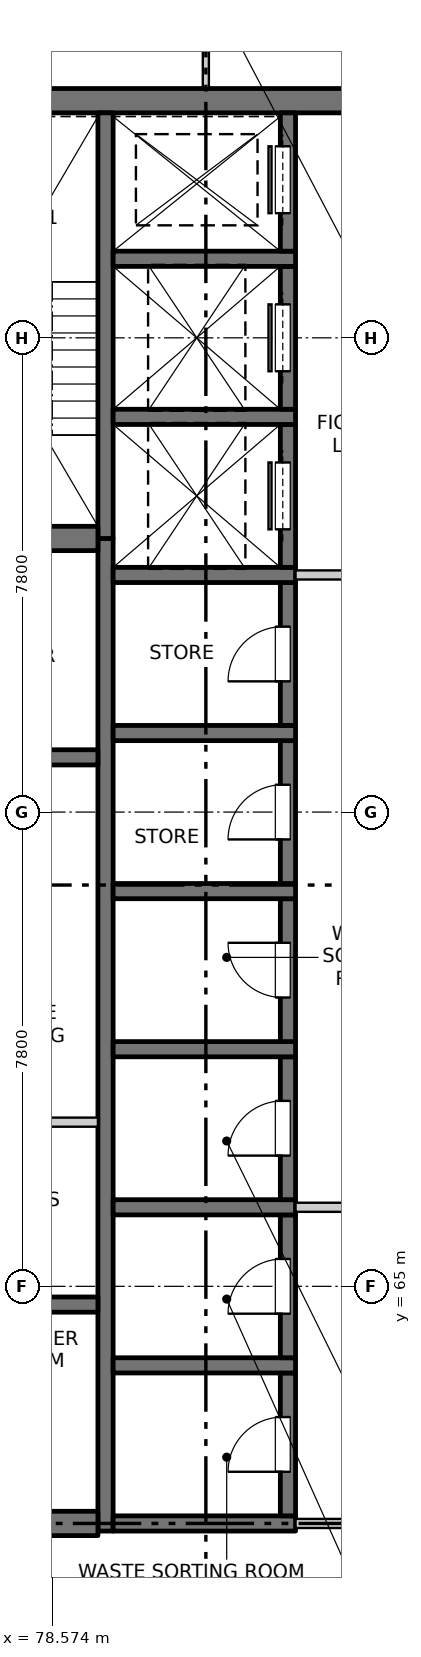
"""IFC4 building model, lengths in metres.
Left out: names, types, materials, properties, quantities, classifications, styles, units other than length and angle.
Written with IfcOpenShell. Run it as: python <this file> out.ifc"""

import sys

from ifc_helpers import new_model, si_unit, direction, frame, frame_2d, origin, place, context, subcontext, project, spatial, rectangle, extrude, element, fill, save


model = new_model("IFC4")
c1 = context("Model", 3, precision=1e-05, world=origin(), true_north=direction((0.0, 1.0)))
c2 = subcontext(c1, "Body", "Model", "MODEL_VIEW")
j1 = project(units=[si_unit("LENGTHUNIT", "METRE"), si_unit("PLANEANGLEUNIT", "RADIAN")], contexts=[c1])
p1 = place(None, origin())
s1 = spatial("IfcSite", under=j1, at=p1, CompositionType="ELEMENT")
p2 = place(p1, origin())
s2 = spatial("IfcBuilding", under=s1, at=p2, CompositionType="ELEMENT")
p3 = place(p2, frame((0.0, 0.0, 231.3)))
s3 = spatial("IfcBuildingStorey", under=s2, at=p3, CompositionType="ELEMENT", Elevation=231.3)
p4 = place(p3, frame((75.45, 84.5, -0.25), z_axis=(0.0, 0.0, 1.0), x_axis=(1.0, 0.0, 0.0)))
e1 = element("IfcWall", 1, at=p4, inside=s3, PredefinedType="SOLIDWALL", context=c2, shape_type="SweptSolid", body=[
    extrude(rectangle(XDim=19.1, YDim=0.4, at=frame_2d((9.55, 0.0))), origin(), (0.0, 0.0, 1.0), 3.4),
])
p5 = place(p3, frame((79.45, 60.975, -0.25), z_axis=(0.0, 0.0, 1.0), x_axis=(0.0, 1.0, 0.0)))
e2 = element("IfcWall", 2, at=p5, inside=s3, PredefinedType="SOLIDWALL", context=c2, shape_type="SweptSolid", body=[
    extrude(rectangle(XDim=16.325, YDim=0.25, at=frame_2d((8.163, 0.0))), origin(), (0.0, 0.0, 1.0), 3.4),
])
p6 = place(p3, frame((79.45, 77.3, -0.25), z_axis=(0.0, 0.0, 1.0), x_axis=(0.0, 1.0, 0.0)))
e3 = element("IfcWall", 3, at=p6, inside=s3, PredefinedType="SOLIDWALL", context=c2, shape_type="SweptSolid", body=[
    extrude(rectangle(XDim=7.0, YDim=0.25, at=frame_2d((3.5, 0.0))), origin(), (0.0, 0.0, 1.0), 3.4),
])
p7 = place(p3, frame((79.575, 61.1, -0.25), z_axis=(0.0, 0.0, 1.0), x_axis=(1.0, 0.0, 0.0)))
e4 = element("IfcWall", 4, at=p7, inside=s3, PredefinedType="SOLIDWALL", context=c2, shape_type="SweptSolid", body=[
    extrude(rectangle(XDim=3.0, YDim=0.25, at=frame_2d((1.5, 0.0))), origin(), (0.0, 0.0, 1.0), 3.4),
])
p8 = place(p3, frame((82.45, 61.225, -0.25), z_axis=(0.0, 0.0, 1.0), x_axis=(0.0, 1.0, 0.0)))
e5 = element("IfcWall", 5, at=p8, inside=s3, PredefinedType="SOLIDWALL", context=c2, shape_type="SweptSolid", body=[
    extrude(rectangle(XDim=2.35, YDim=0.25, at=frame_2d((1.175, 0.0))), origin(), (0.0, 0.0, 1.0), 3.4),
])
p9 = place(p8, frame((0.725, 0.0, 0.25)))
e6 = element("IfcOpeningElement", 6, at=p9, cuts=e5, PredefinedType="OPENING", context=c2, shape_type="SweptSolid", body=[
    extrude(rectangle(XDim=0.9, YDim=2.1, at=frame_2d((0.45, 1.05))), frame((0.0, 0.135, 0.0), z_axis=(0.0, -1.0, 0.0), x_axis=(1.0, 0.0, 0.0)), (0.0, 0.0, 1.0), 0.27),
])
p10 = place(p3, frame((79.575, 63.7, -0.25), z_axis=(0.0, 0.0, 1.0), x_axis=(1.0, 0.0, 0.0)))
e7 = element("IfcWall", 7, at=p10, inside=s3, PredefinedType="SOLIDWALL", context=c2, shape_type="SweptSolid", body=[
    extrude(rectangle(XDim=3.0, YDim=0.25, at=frame_2d((1.5, 0.0))), origin(), (0.0, 0.0, 1.0), 3.4),
])
p11 = place(p3, frame((82.45, 63.825, -0.25), z_axis=(0.0, 0.0, 1.0), x_axis=(0.0, 1.0, 0.0)))
e8 = element("IfcWall", 8, at=p11, inside=s3, PredefinedType="SOLIDWALL", context=c2, shape_type="SweptSolid", body=[
    extrude(rectangle(XDim=2.35, YDim=0.25, at=frame_2d((1.175, 0.0))), origin(), (0.0, 0.0, 1.0), 3.4),
])
p12 = place(p11, frame((0.725, 0.0, 0.25)))
e9 = element("IfcOpeningElement", 9, at=p12, cuts=e8, PredefinedType="OPENING", context=c2, shape_type="SweptSolid", body=[
    extrude(rectangle(XDim=0.9, YDim=2.1, at=frame_2d((0.45, 1.05))), frame((0.0, 0.135, 0.0), z_axis=(0.0, -1.0, 0.0), x_axis=(1.0, 0.0, 0.0)), (0.0, 0.0, 1.0), 0.27),
])
p13 = place(p3, frame((79.575, 66.3, -0.25), z_axis=(0.0, 0.0, 1.0), x_axis=(1.0, 0.0, 0.0)))
e10 = element("IfcWall", 10, at=p13, inside=s3, PredefinedType="SOLIDWALL", context=c2, shape_type="SweptSolid", body=[
    extrude(rectangle(XDim=3.0, YDim=0.25, at=frame_2d((1.5, 0.0))), origin(), (0.0, 0.0, 1.0), 3.4),
])
p14 = place(p3, frame((82.45, 66.425, -0.25), z_axis=(0.0, 0.0, 1.0), x_axis=(0.0, 1.0, 0.0)))
e11 = element("IfcWall", 11, at=p14, inside=s3, PredefinedType="SOLIDWALL", context=c2, shape_type="SweptSolid", body=[
    extrude(rectangle(XDim=2.35, YDim=0.25, at=frame_2d((1.175, 0.0))), origin(), (0.0, 0.0, 1.0), 3.4),
])
p15 = place(p14, frame((0.725, 0.0, 0.25)))
e12 = element("IfcOpeningElement", 12, at=p15, cuts=e11, PredefinedType="OPENING", context=c2, shape_type="SweptSolid", body=[
    extrude(rectangle(XDim=0.9, YDim=2.1, at=frame_2d((0.45, 1.05))), frame((0.0, 0.135, 0.0), z_axis=(0.0, -1.0, 0.0), x_axis=(1.0, 0.0, 0.0)), (0.0, 0.0, 1.0), 0.27),
])
p16 = place(p3, frame((79.575, 68.9, -0.25), z_axis=(0.0, 0.0, 1.0), x_axis=(1.0, 0.0, 0.0)))
e13 = element("IfcWall", 13, at=p16, inside=s3, PredefinedType="SOLIDWALL", context=c2, shape_type="SweptSolid", body=[
    extrude(rectangle(XDim=3.0, YDim=0.25, at=frame_2d((1.5, 0.0))), origin(), (0.0, 0.0, 1.0), 3.4),
])
p17 = place(p3, frame((82.45, 69.025, -0.25), z_axis=(0.0, 0.0, 1.0), x_axis=(0.0, 1.0, 0.0)))
e14 = element("IfcWall", 14, at=p17, inside=s3, PredefinedType="SOLIDWALL", context=c2, shape_type="SweptSolid", body=[
    extrude(rectangle(XDim=2.35, YDim=0.25, at=frame_2d((1.175, 0.0))), origin(), (0.0, 0.0, 1.0), 3.4),
])
p18 = place(p17, frame((0.725, 0.0, 0.25)))
e15 = element("IfcOpeningElement", 15, at=p18, cuts=e14, PredefinedType="OPENING", context=c2, shape_type="SweptSolid", body=[
    extrude(rectangle(XDim=0.9, YDim=2.1, at=frame_2d((0.45, 1.05))), frame((0.0, 0.135, 0.0), z_axis=(0.0, -1.0, 0.0), x_axis=(1.0, 0.0, 0.0)), (0.0, 0.0, 1.0), 0.27),
])
p19 = place(p3, frame((79.575, 71.5, -0.25), z_axis=(0.0, 0.0, 1.0), x_axis=(1.0, 0.0, 0.0)))
e16 = element("IfcWall", 16, at=p19, inside=s3, PredefinedType="SOLIDWALL", context=c2, shape_type="SweptSolid", body=[
    extrude(rectangle(XDim=3.0, YDim=0.25, at=frame_2d((1.5, 0.0))), origin(), (0.0, 0.0, 1.0), 3.4),
])
p20 = place(p3, frame((82.45, 71.625, -0.25), z_axis=(0.0, 0.0, 1.0), x_axis=(0.0, 1.0, 0.0)))
e17 = element("IfcWall", 17, at=p20, inside=s3, PredefinedType="SOLIDWALL", context=c2, shape_type="SweptSolid", body=[
    extrude(rectangle(XDim=2.35, YDim=0.25, at=frame_2d((1.175, 0.0))), origin(), (0.0, 0.0, 1.0), 3.4),
])
p21 = place(p20, frame((0.725, 0.0, 0.25)))
e18 = element("IfcOpeningElement", 18, at=p21, cuts=e17, PredefinedType="OPENING", context=c2, shape_type="SweptSolid", body=[
    extrude(rectangle(XDim=0.9, YDim=2.1, at=frame_2d((0.45, 1.05))), frame((0.0, 0.135, 0.0), z_axis=(0.0, -1.0, 0.0), x_axis=(1.0, 0.0, 0.0)), (0.0, 0.0, 1.0), 0.27),
])
p22 = place(p3, frame((79.575, 74.1, -0.25), z_axis=(0.0, 0.0, 1.0), x_axis=(1.0, 0.0, 0.0)))
e19 = element("IfcWall", 19, at=p22, inside=s3, PredefinedType="SOLIDWALL", context=c2, shape_type="SweptSolid", body=[
    extrude(rectangle(XDim=3.0, YDim=0.25, at=frame_2d((1.5, 0.0))), origin(), (0.0, 0.0, 1.0), 3.4),
])
p23 = place(p3, frame((82.45, 74.225, -0.25), z_axis=(0.0, 0.0, 1.0), x_axis=(0.0, 1.0, 0.0)))
e20 = element("IfcWall", 20, at=p23, inside=s3, PredefinedType="SOLIDWALL", context=c2, shape_type="SweptSolid", body=[
    extrude(rectangle(XDim=2.35, YDim=0.25, at=frame_2d((1.175, 0.0))), origin(), (0.0, 0.0, 1.0), 3.4),
])
p24 = place(p23, frame((0.725, 0.0, 0.25)))
e21 = element("IfcOpeningElement", 21, at=p24, cuts=e20, PredefinedType="OPENING", context=c2, shape_type="SweptSolid", body=[
    extrude(rectangle(XDim=0.9, YDim=2.1, at=frame_2d((0.45, 1.05))), frame((0.0, 0.135, 0.0), z_axis=(0.0, -1.0, 0.0), x_axis=(1.0, 0.0, 0.0)), (0.0, 0.0, 1.0), 0.27),
])
p25 = place(p3, frame((79.575, 76.7, -0.25), z_axis=(0.0, 0.0, 1.0), x_axis=(1.0, 0.0, 0.0)))
e22 = element("IfcWall", 22, at=p25, inside=s3, PredefinedType="SOLIDWALL", context=c2, shape_type="SweptSolid", body=[
    extrude(rectangle(XDim=3.0, YDim=0.25, at=frame_2d((1.5, 0.0))), origin(), (0.0, 0.0, 1.0), 3.4),
])
p26 = place(p3, frame((82.45, 76.825, -0.25), z_axis=(0.0, 0.0, 1.0), x_axis=(0.0, 1.0, 0.0)))
e23 = element("IfcWall", 23, at=p26, inside=s3, PredefinedType="SOLIDWALL", context=c2, shape_type="SweptSolid", body=[
    extrude(rectangle(XDim=2.35, YDim=0.25, at=frame_2d((1.175, 0.0))), origin(), (0.0, 0.0, 1.0), 3.4),
])
p27 = place(p26, frame((0.625, 0.0, 0.25)))
e24 = element("IfcOpeningElement", 24, at=p27, cuts=e23, PredefinedType="OPENING", context=c2, shape_type="SweptSolid", body=[
    extrude(rectangle(XDim=1.1, YDim=2.1, at=frame_2d((0.55, 1.05))), frame((0.0, 0.135, 0.0), z_axis=(0.0, -1.0, 0.0), x_axis=(1.0, 0.0, 0.0)), (0.0, 0.0, 1.0), 0.27),
])
p28 = place(p3, frame((79.575, 79.3, -0.25), z_axis=(0.0, 0.0, 1.0), x_axis=(1.0, 0.0, 0.0)))
e25 = element("IfcWall", 25, at=p28, inside=s3, PredefinedType="SOLIDWALL", context=c2, shape_type="SweptSolid", body=[
    extrude(rectangle(XDim=3.0, YDim=0.25, at=frame_2d((1.5, 0.0))), origin(), (0.0, 0.0, 1.0), 3.4),
])
p29 = place(p3, frame((82.45, 79.425, -0.25), z_axis=(0.0, 0.0, 1.0), x_axis=(0.0, 1.0, 0.0)))
e26 = element("IfcWall", 26, at=p29, inside=s3, PredefinedType="SOLIDWALL", context=c2, shape_type="SweptSolid", body=[
    extrude(rectangle(XDim=2.35, YDim=0.25, at=frame_2d((1.175, 0.0))), origin(), (0.0, 0.0, 1.0), 3.4),
])
p30 = place(p29, frame((0.625, 0.0, 0.25)))
e27 = element("IfcOpeningElement", 27, at=p30, cuts=e26, PredefinedType="OPENING", context=c2, shape_type="SweptSolid", body=[
    extrude(rectangle(XDim=1.1, YDim=2.1, at=frame_2d((0.55, 1.05))), frame((0.0, 0.135, 0.0), z_axis=(0.0, -1.0, 0.0), x_axis=(1.0, 0.0, 0.0)), (0.0, 0.0, 1.0), 0.27),
])
p31 = place(p3, frame((79.575, 81.9, -0.25), z_axis=(0.0, 0.0, 1.0), x_axis=(1.0, 0.0, 0.0)))
e28 = element("IfcWall", 28, at=p31, inside=s3, PredefinedType="SOLIDWALL", context=c2, shape_type="SweptSolid", body=[
    extrude(rectangle(XDim=3.0, YDim=0.25, at=frame_2d((1.5, 0.0))), origin(), (0.0, 0.0, 1.0), 3.4),
])
p32 = place(p3, frame((82.45, 82.025, -0.25), z_axis=(0.0, 0.0, 1.0), x_axis=(0.0, 1.0, 0.0)))
e29 = element("IfcWall", 29, at=p32, inside=s3, PredefinedType="SOLIDWALL", context=c2, shape_type="SweptSolid", body=[
    extrude(rectangle(XDim=2.275, YDim=0.25, at=frame_2d((1.138, 0.0))), origin(), (0.0, 0.0, 1.0), 3.4),
])
p33 = place(p32, frame((0.625, 0.0, 0.25)))
e30 = element("IfcOpeningElement", 30, at=p33, cuts=e29, PredefinedType="OPENING", context=c2, shape_type="SweptSolid", body=[
    extrude(rectangle(XDim=1.1, YDim=2.1, at=frame_2d((0.55, 1.05))), frame((0.0, 0.135, 0.0), z_axis=(0.0, -1.0, 0.0), x_axis=(1.0, 0.0, 0.0)), (0.0, 0.0, 1.0), 0.27),
])
p34 = place(p3, frame((75.45, 61.1, -0.25), z_axis=(0.0, 0.0, 1.0), x_axis=(1.0, 0.0, 0.0)))
e31 = element("IfcWall", 31, at=p34, inside=s3, PredefinedType="SOLIDWALL", context=c2, shape_type="SweptSolid", body=[
    extrude(rectangle(XDim=3.875, YDim=0.4, at=frame_2d((1.938, 0.0))), origin(), (0.0, 0.0, 1.0), 3.4),
])
for number, where, z_axis, x_axis in (
    (32, (75.45, 64.7, -0.25), (0.0, 0.0, 1.0), (1.0, 0.0, 0.0)),
    (33, (75.45, 73.7, -0.25), (0.0, 0.0, 1.0), (1.0, 0.0, 0.0)),
):
    element("IfcWall", number, at=place(p3, frame(where, z_axis=z_axis, x_axis=x_axis)), inside=s3, PredefinedType="SOLIDWALL", context=c2, shape_type="SweptSolid", body=[
        extrude(rectangle(XDim=3.875, YDim=0.25, at=frame_2d((1.938, 0.0))), origin(), (0.0, 0.0, 1.0), 3.4),
    ])
p35 = place(p3, frame((75.45, 77.3, -0.25), z_axis=(0.0, 0.0, 1.0), x_axis=(1.0, 0.0, 0.0)))
e34 = element("IfcWall", 34, at=p35, inside=s3, PredefinedType="SOLIDWALL", context=c2, shape_type="SweptSolid", body=[
    extrude(rectangle(XDim=3.875, YDim=0.4, at=frame_2d((1.938, 0.0))), origin(), (0.0, 0.0, 1.0), 3.4),
])
p36 = place(p3, frame((82.575, 61.1, 0.0), z_axis=(0.0, 0.0, 1.0), x_axis=(1.0, 0.0, 0.0)))
e35 = element("IfcWall", 35, at=p36, inside=s3, PredefinedType="PARTITIONING", context=c2, shape_type="SweptSolid", body=[
    extrude(rectangle(XDim=4.85, YDim=0.15, at=frame_2d((2.425, 0.0))), origin(), (0.0, 0.0, 1.0), 3.15),
])
p37 = place(p36, frame((1.525, 0.0, 0.0)))
e36 = element("IfcOpeningElement", 36, at=p37, cuts=e35, PredefinedType="OPENING", context=c2, shape_type="SweptSolid", body=[
    extrude(rectangle(XDim=1.8, YDim=2.1, at=frame_2d((0.9, 1.05))), frame((0.0, 0.085, 0.0), z_axis=(0.0, -1.0, 0.0), x_axis=(1.0, 0.0, 0.0)), (0.0, 0.0, 1.0), 0.17),
])
p38 = place(p3, frame((82.575, 66.3, 0.0), z_axis=(0.0, 0.0, 1.0), x_axis=(1.0, 0.0, 0.0)))
e37 = element("IfcWall", 37, at=p38, inside=s3, PredefinedType="PARTITIONING", context=c2, shape_type="SweptSolid", body=[
    extrude(rectangle(XDim=4.85, YDim=0.15, at=frame_2d((2.425, 0.0))), origin(), (0.0, 0.0, 1.0), 3.15),
])
p39 = place(p38, frame((1.525, 0.0, 0.0)))
e38 = element("IfcOpeningElement", 38, at=p39, cuts=e37, PredefinedType="OPENING", context=c2, shape_type="SweptSolid", body=[
    extrude(rectangle(XDim=1.8, YDim=2.1, at=frame_2d((0.9, 1.05))), frame((0.0, 0.085, 0.0), z_axis=(0.0, -1.0, 0.0), x_axis=(1.0, 0.0, 0.0)), (0.0, 0.0, 1.0), 0.17),
])
p40 = place(p3, frame((75.45, 67.7, 0.0), z_axis=(0.0, 0.0, 1.0), x_axis=(1.0, 0.0, 0.0)))
e39 = element("IfcWall", 39, at=p40, inside=s3, PredefinedType="PARTITIONING", context=c2, shape_type="SweptSolid", body=[
    extrude(rectangle(XDim=3.875, YDim=0.15, at=frame_2d((1.938, 0.0))), origin(), (0.0, 0.0, 1.0), 3.15),
])
p41 = place(p3, frame((82.575, 76.7, 0.0), z_axis=(0.0, 0.0, 1.0), x_axis=(1.0, 0.0, 0.0)))
e40 = element("IfcWall", 40, at=p41, inside=s3, PredefinedType="PARTITIONING", context=c2, shape_type="SweptSolid", body=[
    extrude(rectangle(XDim=4.85, YDim=0.15, at=frame_2d((2.425, 0.0))), origin(), (0.0, 0.0, 1.0), 3.15),
])
p42 = place(p41, frame((1.525, 0.0, 0.0)))
e41 = element("IfcOpeningElement", 41, at=p42, cuts=e40, PredefinedType="OPENING", context=c2, shape_type="SweptSolid", body=[
    extrude(rectangle(XDim=1.8, YDim=2.1, at=frame_2d((0.9, 1.05))), frame((0.0, 0.085, 0.0), z_axis=(0.0, -1.0, 0.0), x_axis=(1.0, 0.0, 0.0)), (0.0, 0.0, 1.0), 0.17),
])
p43 = place(p3, frame((81.1, 84.7, 0.0), z_axis=(0.0, 0.0, 1.0), x_axis=(0.0, 1.0, 0.0)))
e42 = element("IfcWall", 42, at=p43, inside=s3, PredefinedType="PARTITIONING", context=c2, shape_type="SweptSolid", body=[
    extrude(rectangle(XDim=3.4, YDim=0.1, at=frame_2d((1.7, 0.0))), origin(), (0.0, 0.0, 1.0), 3.15),
])
p44 = place(p43, frame((1.3, 0.0, 0.0)))
e43 = element("IfcOpeningElement", 43, at=p44, cuts=e42, PredefinedType="OPENING", context=c2, shape_type="SweptSolid", body=[
    extrude(rectangle(XDim=0.9, YDim=2.1, at=frame_2d((0.45, 1.05))), frame((0.0, 0.06, 0.0), z_axis=(0.0, -1.0, 0.0), x_axis=(1.0, 0.0, 0.0)), (0.0, 0.0, 1.0), 0.12),
])
p45 = place(p9, origin())
e44 = element("IfcDoor", 44, at=p45, inside=s3, OperationType="SINGLE_SWING_LEFT", PredefinedType="DOOR", context=c2, shape_type="SweptSolid", body=[
    extrude(rectangle(XDim=0.9, YDim=2.1, at=frame_2d((0.45, 1.05))), frame((0.0, 0.11, 0.0), z_axis=(0.0, -1.0, 0.0), x_axis=(1.0, 0.0, 0.0)), (0.0, 0.0, 1.0), 0.05),
])
fill(e6, e44)
p46 = place(p12, origin())
e45 = element("IfcDoor", 45, at=p46, inside=s3, OperationType="SINGLE_SWING_LEFT", PredefinedType="DOOR", context=c2, shape_type="SweptSolid", body=[
    extrude(rectangle(XDim=0.9, YDim=2.1, at=frame_2d((0.45, 1.05))), frame((0.0, 0.11, 0.0), z_axis=(0.0, -1.0, 0.0), x_axis=(1.0, 0.0, 0.0)), (0.0, 0.0, 1.0), 0.05),
])
fill(e9, e45)
p47 = place(p15, origin())
e46 = element("IfcDoor", 46, at=p47, inside=s3, OperationType="SINGLE_SWING_LEFT", PredefinedType="DOOR", context=c2, shape_type="SweptSolid", body=[
    extrude(rectangle(XDim=0.9, YDim=2.1, at=frame_2d((0.45, 1.05))), frame((0.0, 0.11, 0.0), z_axis=(0.0, -1.0, 0.0), x_axis=(1.0, 0.0, 0.0)), (0.0, 0.0, 1.0), 0.05),
])
fill(e12, e46)
p48 = place(p18, origin())
e47 = element("IfcDoor", 47, at=p48, inside=s3, OperationType="SINGLE_SWING_RIGHT", PredefinedType="DOOR", context=c2, shape_type="SweptSolid", body=[
    extrude(rectangle(XDim=0.9, YDim=2.1, at=frame_2d((0.45, 1.05))), frame((0.0, 0.11, 0.0), z_axis=(0.0, -1.0, 0.0), x_axis=(1.0, 0.0, 0.0)), (0.0, 0.0, 1.0), 0.05),
])
fill(e15, e47)
p49 = place(p21, origin())
e48 = element("IfcDoor", 48, at=p49, inside=s3, OperationType="SINGLE_SWING_LEFT", PredefinedType="DOOR", context=c2, shape_type="SweptSolid", body=[
    extrude(rectangle(XDim=0.9, YDim=2.1, at=frame_2d((0.45, 1.05))), frame((0.0, 0.11, 0.0), z_axis=(0.0, -1.0, 0.0), x_axis=(1.0, 0.0, 0.0)), (0.0, 0.0, 1.0), 0.05),
])
fill(e18, e48)
p50 = place(p24, origin())
e49 = element("IfcDoor", 49, at=p50, inside=s3, OperationType="SINGLE_SWING_LEFT", PredefinedType="DOOR", context=c2, shape_type="SweptSolid", body=[
    extrude(rectangle(XDim=0.9, YDim=2.1, at=frame_2d((0.45, 1.05))), frame((0.0, 0.11, 0.0), z_axis=(0.0, -1.0, 0.0), x_axis=(1.0, 0.0, 0.0)), (0.0, 0.0, 1.0), 0.05),
])
fill(e21, e49)
p51 = place(p27, origin())
e50 = element("IfcDoor", 50, at=p51, inside=s3, OperationType="SLIDING_TO_LEFT", PredefinedType="DOOR", context=c2, shape_type="SweptSolid", body=[
    extrude(rectangle(XDim=1.1, YDim=2.1, at=frame_2d((0.55, 1.05))), frame((0.0, 0.11, 0.0), z_axis=(0.0, -1.0, 0.0), x_axis=(1.0, 0.0, 0.0)), (0.0, 0.0, 1.0), 0.05),
])
fill(e24, e50)
p52 = place(p30, origin())
e51 = element("IfcDoor", 51, at=p52, inside=s3, OperationType="SLIDING_TO_LEFT", PredefinedType="DOOR", context=c2, shape_type="SweptSolid", body=[
    extrude(rectangle(XDim=1.1, YDim=2.1, at=frame_2d((0.55, 1.05))), frame((0.0, 0.11, 0.0), z_axis=(0.0, -1.0, 0.0), x_axis=(1.0, 0.0, 0.0)), (0.0, 0.0, 1.0), 0.05),
])
fill(e27, e51)
p53 = place(p33, origin())
e52 = element("IfcDoor", 52, at=p53, inside=s3, OperationType="SLIDING_TO_RIGHT", PredefinedType="DOOR", context=c2, shape_type="SweptSolid", body=[
    extrude(rectangle(XDim=1.1, YDim=2.1, at=frame_2d((0.55, 1.05))), frame((0.0, 0.11, 0.0), z_axis=(0.0, -1.0, 0.0), x_axis=(1.0, 0.0, 0.0)), (0.0, 0.0, 1.0), 0.05),
])
fill(e30, e52)
save(model, sys.argv[1])
